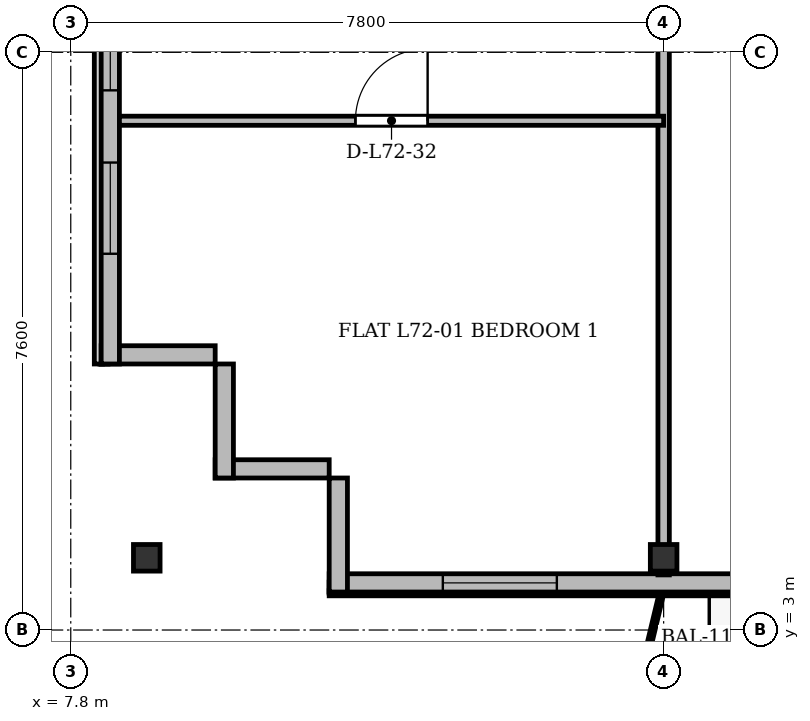
"""IFC4 building model, lengths in metres.
Left out: names, types, materials, properties, quantities, classifications, styles, units other than length and angle.
Written with IfcOpenShell. Run it as: python <this file> out.ifc"""

import sys

from ifc_helpers import new_model, si_unit, direction, frame, frame_2d, origin, origin_2d, place, context, subcontext, project, spatial, rectangle, i_section, extrude, source, transform, mapped, element, fill, save


model = new_model("IFC4")
c1 = context("Model", 3, precision=1e-05, world=origin(), true_north=direction((0.0, 1.0)))
c2 = subcontext(c1, "Body", "Model", "MODEL_VIEW")
j1 = project(units=[si_unit("LENGTHUNIT", "METRE"), si_unit("PLANEANGLEUNIT", "RADIAN")], contexts=[c1])
p1 = place(None, origin())
s1 = spatial("IfcSite", under=j1, at=p1, CompositionType="ELEMENT")
p2 = place(p1, origin())
s2 = spatial("IfcBuilding", under=s1, at=p2, CompositionType="ELEMENT")
p3 = place(p2, frame((0.0, 0.0, 277.5)))
s3 = spatial("IfcBuildingStorey", under=s2, at=p3, CompositionType="ELEMENT", Elevation=277.5)
m1 = source(origin(), c2, "Body", "SweptSolid", [
    extrude(i_section(OverallWidth=0.35, OverallDepth=0.35, WebThickness=0.018, FlangeThickness=0.028, at=origin_2d()), origin(), (0.0, 0.0, 1.0), 3.6),
])
for number, where, z_axis, x_axis in (
    (1, (8.8, 3.95, 0.0), (0.0, 0.0, 1.0), (1.0, 0.0, 0.0)),
    (2, (15.6, 3.95, 0.0), (0.0, 0.0, 1.0), (1.0, 0.0, 0.0)),
):
    element("IfcColumn", number, at=place(p3, frame(where, z_axis=z_axis, x_axis=x_axis)), inside=s3, PredefinedType="COLUMN", context=c2, shape_type="MappedRepresentation", body=[
        mapped(m1, transform((0.0, 0.0, 0.0), x_axis=(1.0, 0.0, 0.0), y_axis=(0.0, 1.0, 0.0), z_axis=(0.0, 0.0, 1.0), scale=1.0)),
    ])
for number, where, z_axis, x_axis in (
    (3, (11.2, 5.12, 0.0), (0.0, 0.0, 1.0), (-1.0, 0.0, 0.0)),
    (4, (9.82, 5.0, 0.0), (0.0, 0.0, 1.0), (0.0, 1.0, 0.0)),
):
    element("IfcWall", number, at=place(p3, frame(where, z_axis=z_axis, x_axis=x_axis)), inside=s3, PredefinedType="SOLIDWALL", context=c2, shape_type="SweptSolid", body=[
        extrude(rectangle(XDim=1.5, YDim=0.24, at=frame_2d((0.75, 0.0))), origin(), (0.0, 0.0, 1.0), 3.37),
    ])
p4 = place(p3, frame((9.7, 6.62, 0.0), z_axis=(0.0, 0.0, 1.0), x_axis=(-1.0, 0.0, 0.0)))
e5 = element("IfcWall", 5, at=p4, inside=s3, PredefinedType="SOLIDWALL", context=c2, shape_type="SweptSolid", body=[
    extrude(rectangle(XDim=1.5, YDim=0.24, at=frame_2d((0.75, 0.0))), origin(), (0.0, 0.0, 1.0), 2.87),
])
p5 = place(p3, frame((8.32, 6.5, 0.0), z_axis=(0.0, 0.0, 1.0), x_axis=(0.0, 1.0, 0.0)))
e6 = element("IfcWall", 6, at=p5, inside=s3, PredefinedType="SOLIDWALL", context=c2, shape_type="SweptSolid", body=[
    extrude(rectangle(XDim=39.0, YDim=0.24, at=frame_2d((19.5, 0.0))), origin(), (0.0, 0.0, 1.0), 3.37),
])
p6 = place(p5, frame((1.45, 0.0, 0.92)))
e7 = element("IfcOpeningElement", 7, at=p6, cuts=e6, PredefinedType="OPENING", context=c2, shape_type="SweptSolid", body=[
    extrude(rectangle(XDim=1.2, YDim=1.65, at=frame_2d((0.6, 0.825))), frame((0.0, 0.13, 0.0), z_axis=(0.0, -1.0, 0.0), x_axis=(1.0, 0.0, 0.0)), (0.0, 0.0, 1.0), 0.26),
])
p7 = place(p5, frame((3.6, 0.0, 0.92)))
e8 = element("IfcOpeningElement", 8, at=p7, cuts=e6, PredefinedType="OPENING", context=c2, shape_type="SweptSolid", body=[
    extrude(rectangle(XDim=2.6, YDim=1.9, at=frame_2d((1.3, 0.95))), frame((0.0, 0.13, 0.0), z_axis=(0.0, -1.0, 0.0), x_axis=(1.0, 0.0, 0.0)), (0.0, 0.0, 1.0), 0.26),
])
p8 = place(p5, frame((7.8, 0.0, 0.92)))
e9 = element("IfcOpeningElement", 9, at=p8, cuts=e6, PredefinedType="OPENING", context=c2, shape_type="SweptSolid", body=[
    extrude(rectangle(XDim=2.6, YDim=1.9, at=frame_2d((1.3, 0.95))), frame((0.0, 0.13, 0.0), z_axis=(0.0, -1.0, 0.0), x_axis=(1.0, 0.0, 0.0)), (0.0, 0.0, 1.0), 0.26),
])
p9 = place(p5, frame((15.0, 0.0, 0.92)))
e10 = element("IfcOpeningElement", 10, at=p9, cuts=e6, PredefinedType="OPENING", context=c2, shape_type="SweptSolid", body=[
    extrude(rectangle(XDim=2.6, YDim=1.9, at=frame_2d((1.3, 0.95))), frame((0.0, 0.13, 0.0), z_axis=(0.0, -1.0, 0.0), x_axis=(1.0, 0.0, 0.0)), (0.0, 0.0, 1.0), 0.26),
])
p10 = place(p5, frame((29.0, 0.0, 0.92)))
e11 = element("IfcOpeningElement", 11, at=p10, cuts=e6, PredefinedType="OPENING", context=c2, shape_type="SweptSolid", body=[
    extrude(rectangle(XDim=2.6, YDim=1.9, at=frame_2d((1.3, 0.95))), frame((0.0, 0.13, 0.0), z_axis=(0.0, -1.0, 0.0), x_axis=(1.0, 0.0, 0.0)), (0.0, 0.0, 1.0), 0.26),
])
p11 = place(p5, frame((33.3, 0.0, 0.92)))
e12 = element("IfcOpeningElement", 12, at=p11, cuts=e6, PredefinedType="OPENING", context=c2, shape_type="SweptSolid", body=[
    extrude(rectangle(XDim=1.2, YDim=1.65, at=frame_2d((0.6, 0.825))), frame((0.0, 0.13, 0.0), z_axis=(0.0, -1.0, 0.0), x_axis=(1.0, 0.0, 0.0)), (0.0, 0.0, 1.0), 0.26),
])
p12 = place(p5, frame((36.65, 0.0, 0.92)))
e13 = element("IfcOpeningElement", 13, at=p12, cuts=e6, PredefinedType="OPENING", context=c2, shape_type="SweptSolid", body=[
    extrude(rectangle(XDim=1.2, YDim=1.65, at=frame_2d((0.6, 0.825))), frame((0.0, 0.13, 0.0), z_axis=(0.0, -1.0, 0.0), x_axis=(1.0, 0.0, 0.0)), (0.0, 0.0, 1.0), 0.26),
])
p13 = place(p3, frame((63.2, 3.62, 0.0), z_axis=(0.0, 0.0, 1.0), x_axis=(-1.0, 0.0, 0.0)))
e14 = element("IfcWall", 14, at=p13, inside=s3, PredefinedType="SOLIDWALL", context=c2, shape_type="SweptSolid", body=[
    extrude(rectangle(XDim=52.0, YDim=0.24, at=frame_2d((26.0, 0.0))), origin(), (0.0, 0.0, 1.0), 3.37),
])
p14 = place(p13, frame((1.495, 0.0, 0.9)))
e15 = element("IfcOpeningElement", 15, at=p14, cuts=e14, PredefinedType="OPENING", context=c2, shape_type="SweptSolid", body=[
    extrude(rectangle(XDim=1.5, YDim=1.75, at=frame_2d((0.75, 0.875))), frame((0.0, 0.13, 0.0), z_axis=(0.0, -1.0, 0.0), x_axis=(1.0, 0.0, 0.0)), (0.0, 0.0, 1.0), 0.26),
])
p15 = place(p13, frame((5.2, 0.0, 0.9)))
e16 = element("IfcOpeningElement", 16, at=p15, cuts=e14, PredefinedType="OPENING", context=c2, shape_type="SweptSolid", body=[
    extrude(rectangle(XDim=2.0, YDim=1.95, at=frame_2d((1.0, 0.975))), frame((0.0, 0.13, 0.0), z_axis=(0.0, -1.0, 0.0), x_axis=(1.0, 0.0, 0.0)), (0.0, 0.0, 1.0), 0.26),
])
p16 = place(p13, frame((9.275, 0.0, 0.9)))
e17 = element("IfcOpeningElement", 17, at=p16, cuts=e14, PredefinedType="OPENING", context=c2, shape_type="SweptSolid", body=[
    extrude(rectangle(XDim=1.65, YDim=1.85, at=frame_2d((0.825, 0.925))), frame((0.0, 0.13, 0.0), z_axis=(0.0, -1.0, 0.0), x_axis=(1.0, 0.0, 0.0)), (0.0, 0.0, 1.0), 0.26),
])
p17 = place(p13, frame((14.017, 0.0, 0.0)))
e18 = element("IfcOpeningElement", 18, at=p17, cuts=e14, PredefinedType="OPENING", context=c2, shape_type="SweptSolid", body=[
    extrude(rectangle(XDim=1.2, YDim=2.2, at=frame_2d((0.6, 1.1))), frame((0.0, 0.13, 0.0), z_axis=(0.0, -1.0, 0.0), x_axis=(1.0, 0.0, 0.0)), (0.0, 0.0, 1.0), 0.26),
])
p18 = place(p13, frame((24.9, 0.0, 0.9)))
e19 = element("IfcOpeningElement", 19, at=p18, cuts=e14, PredefinedType="OPENING", context=c2, shape_type="SweptSolid", body=[
    extrude(rectangle(XDim=2.2, YDim=1.8, at=frame_2d((1.1, 0.9))), frame((0.0, 0.13, 0.0), z_axis=(0.0, -1.0, 0.0), x_axis=(1.0, 0.0, 0.0)), (0.0, 0.0, 1.0), 0.26),
])
p19 = place(p13, frame((33.05, 0.0, 0.9)))
e20 = element("IfcOpeningElement", 20, at=p19, cuts=e14, PredefinedType="OPENING", context=c2, shape_type="SweptSolid", body=[
    extrude(rectangle(XDim=1.5, YDim=1.75, at=frame_2d((0.75, 0.875))), frame((0.0, 0.13, 0.0), z_axis=(0.0, -1.0, 0.0), x_axis=(1.0, 0.0, 0.0)), (0.0, 0.0, 1.0), 0.26),
])
p20 = place(p13, frame((35.45, 0.0, 0.9)))
e21 = element("IfcOpeningElement", 21, at=p20, cuts=e14, PredefinedType="OPENING", context=c2, shape_type="SweptSolid", body=[
    extrude(rectangle(XDim=1.5, YDim=1.75, at=frame_2d((0.75, 0.875))), frame((0.0, 0.13, 0.0), z_axis=(0.0, -1.0, 0.0), x_axis=(1.0, 0.0, 0.0)), (0.0, 0.0, 1.0), 0.26),
])
p21 = place(p13, frame((37.775, 0.0, 0.9)))
e22 = element("IfcOpeningElement", 22, at=p21, cuts=e14, PredefinedType="OPENING", context=c2, shape_type="SweptSolid", body=[
    extrude(rectangle(XDim=1.65, YDim=1.85, at=frame_2d((0.825, 0.925))), frame((0.0, 0.13, 0.0), z_axis=(0.0, -1.0, 0.0), x_axis=(1.0, 0.0, 0.0)), (0.0, 0.0, 1.0), 0.26),
])
p22 = place(p13, frame((41.452, 0.0, 0.0)))
e23 = element("IfcOpeningElement", 23, at=p22, cuts=e14, PredefinedType="OPENING", context=c2, shape_type="SweptSolid", body=[
    extrude(rectangle(XDim=1.2, YDim=2.2, at=frame_2d((0.6, 1.1))), frame((0.0, 0.13, 0.0), z_axis=(0.0, -1.0, 0.0), x_axis=(1.0, 0.0, 0.0)), (0.0, 0.0, 1.0), 0.26),
])
p23 = place(p13, frame((44.3, 0.0, 0.9)))
e24 = element("IfcOpeningElement", 24, at=p23, cuts=e14, PredefinedType="OPENING", context=c2, shape_type="SweptSolid", body=[
    extrude(rectangle(XDim=2.2, YDim=1.8, at=frame_2d((1.1, 0.9))), frame((0.0, 0.13, 0.0), z_axis=(0.0, -1.0, 0.0), x_axis=(1.0, 0.0, 0.0)), (0.0, 0.0, 1.0), 0.26),
])
p24 = place(p13, frame((49.005, 0.0, 0.9)))
e25 = element("IfcOpeningElement", 25, at=p24, cuts=e14, PredefinedType="OPENING", context=c2, shape_type="SweptSolid", body=[
    extrude(rectangle(XDim=1.5, YDim=1.75, at=frame_2d((0.75, 0.875))), frame((0.0, 0.13, 0.0), z_axis=(0.0, -1.0, 0.0), x_axis=(1.0, 0.0, 0.0)), (0.0, 0.0, 1.0), 0.26),
])
p25 = place(p3, frame((11.32, 3.5, 0.0), z_axis=(0.0, 0.0, 1.0), x_axis=(0.0, 1.0, 0.0)))
e26 = element("IfcWall", 26, at=p25, inside=s3, PredefinedType="SOLIDWALL", context=c2, shape_type="SweptSolid", body=[
    extrude(rectangle(XDim=1.5, YDim=0.24, at=frame_2d((0.75, 0.0))), origin(), (0.0, 0.0, 1.0), 2.92),
])
p26 = place(p3, frame((15.6, 3.725, 0.0), z_axis=(0.0, 0.0, 1.0), x_axis=(0.0, 1.0, 0.0)))
e27 = element("IfcWall", 27, at=p26, inside=s3, PredefinedType="PARTITIONING", context=c2, shape_type="SweptSolid", body=[
    extrude(rectangle(XDim=27.275, YDim=0.15, at=frame_2d((13.637, 0.0))), origin(), (0.0, 0.0, 1.0), 2.87),
])
p27 = place(p3, frame((8.44, 9.7, 0.0), z_axis=(0.0, 0.0, 1.0), x_axis=(1.0, 0.0, 0.0)))
e28 = element("IfcWall", 28, at=p27, inside=s3, PredefinedType="PARTITIONING", context=c2, shape_type="SweptSolid", body=[
    extrude(rectangle(XDim=7.16, YDim=0.12, at=frame_2d((3.58, 0.0))), origin(), (0.0, 0.0, 1.0), 2.87),
])
p28 = place(p27, frame((3.105, 0.0, 0.0)))
e29 = element("IfcOpeningElement", 29, at=p28, cuts=e28, PredefinedType="OPENING", context=c2, shape_type="SweptSolid", body=[
    extrude(rectangle(XDim=0.95, YDim=2.15, at=frame_2d((0.475, 1.075))), frame((0.0, 0.07, 0.0), z_axis=(0.0, -1.0, 0.0), x_axis=(1.0, 0.0, 0.0)), (0.0, 0.0, 1.0), 0.14),
])
m2 = source(origin(), c2, "Body", "SweptSolid", [
    extrude(rectangle(XDim=1.2, YDim=1.65, at=frame_2d((0.6, 0.825))), frame((0.0, 0.03, 0.0), z_axis=(0.0, -1.0, 0.0), x_axis=(1.0, 0.0, 0.0)), (0.0, 0.0, 1.0), 0.06),
])
p29 = place(p6, origin())
e30 = element("IfcWindow", 30, at=p29, inside=s3, PartitioningType="SINGLE_PANEL", PredefinedType="WINDOW", context=c2, shape_type="MappedRepresentation", body=[
    mapped(m2, transform((0.0, 0.0, 0.0), x_axis=(1.0, 0.0, 0.0), y_axis=(0.0, 1.0, 0.0), z_axis=(0.0, 0.0, 1.0), scale=1.0)),
])
fill(e7, e30)
m3 = source(origin(), c2, "Body", "SweptSolid", [
    extrude(rectangle(XDim=2.6, YDim=1.9, at=frame_2d((1.3, 0.95))), frame((0.0, 0.03, 0.0), z_axis=(0.0, -1.0, 0.0), x_axis=(1.0, 0.0, 0.0)), (0.0, 0.0, 1.0), 0.06),
])
p30 = place(p7, origin())
e31 = element("IfcWindow", 31, at=p30, inside=s3, PartitioningType="SINGLE_PANEL", PredefinedType="WINDOW", context=c2, shape_type="MappedRepresentation", body=[
    mapped(m3, transform((0.0, 0.0, 0.0), x_axis=(1.0, 0.0, 0.0), y_axis=(0.0, 1.0, 0.0), z_axis=(0.0, 0.0, 1.0), scale=1.0)),
])
fill(e8, e31)
m4 = source(origin(), c2, "Body", "SweptSolid", [
    extrude(rectangle(XDim=1.5, YDim=1.75, at=frame_2d((0.75, 0.875))), frame((0.0, 0.03, 0.0), z_axis=(0.0, -1.0, 0.0), x_axis=(1.0, 0.0, 0.0)), (0.0, 0.0, 1.0), 0.06),
])
p31 = place(p24, origin())
e32 = element("IfcWindow", 32, at=p31, inside=s3, PartitioningType="SINGLE_PANEL", PredefinedType="WINDOW", context=c2, shape_type="MappedRepresentation", body=[
    mapped(m4, transform((0.0, 0.0, 0.0), x_axis=(1.0, 0.0, 0.0), y_axis=(0.0, 1.0, 0.0), z_axis=(0.0, 0.0, 1.0), scale=1.0)),
])
fill(e25, e32)
m5 = source(origin(), c2, "Body", "SweptSolid", [
    extrude(rectangle(XDim=0.95, YDim=2.15, at=frame_2d((0.475, 1.075))), frame((0.0, 0.025, 0.0), z_axis=(0.0, -1.0, 0.0), x_axis=(1.0, 0.0, 0.0)), (0.0, 0.0, 1.0), 0.05),
])
p32 = place(p28, origin())
e33 = element("IfcDoor", 33, at=p32, inside=s3, OperationType="SINGLE_SWING_RIGHT", PredefinedType="DOOR", context=c2, shape_type="MappedRepresentation", body=[
    mapped(m5, transform((0.0, 0.0, 0.0), x_axis=(1.0, 0.0, 0.0), y_axis=(0.0, 1.0, 0.0), z_axis=(0.0, 0.0, 1.0), scale=1.0)),
])
fill(e29, e33)
save(model, sys.argv[1])
